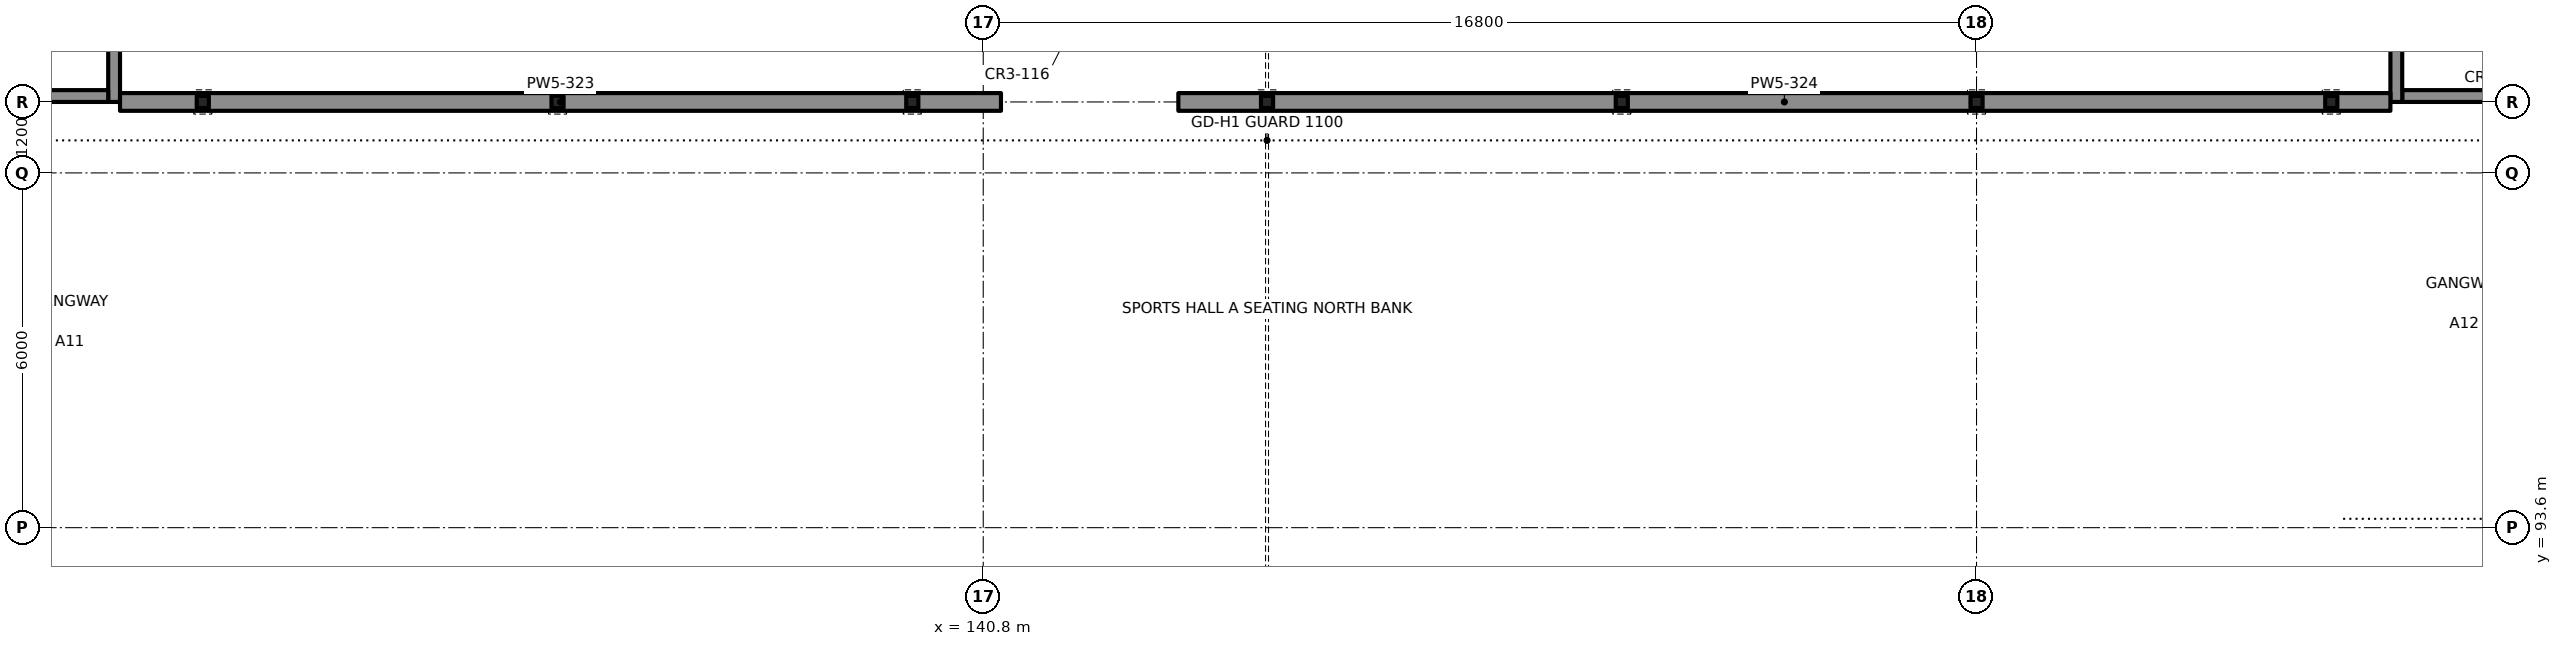
"""IFC4 building model, lengths in metres.
Left out: names, types, materials, properties, quantities, classifications, styles, units other than length and angle.
Written with IfcOpenShell. Run it as: python <this file> out.ifc"""

import sys

from ifc_helpers import new_model, si_unit, direction, frame, frame_2d, origin, origin_2d, place, context, subcontext, project, spatial, rectangle, i_section, extrude, element, save


model = new_model("IFC4")
c1 = context("Model", 3, precision=1e-05, world=origin(), true_north=direction((0.0, 1.0)))
c2 = subcontext(c1, "Body", "Model", "MODEL_VIEW")
j1 = project(units=[si_unit("LENGTHUNIT", "METRE"), si_unit("PLANEANGLEUNIT", "RADIAN")], contexts=[c1])
p1 = place(None, origin())
s1 = spatial("IfcSite", under=j1, at=p1, CompositionType="ELEMENT")
p2 = place(p1, origin())
s2 = spatial("IfcBuilding", under=s1, at=p2, CompositionType="ELEMENT")
p3 = place(p2, origin())
s3 = spatial("IfcBuildingStorey", under=s2, at=p3, CompositionType="ELEMENT", Elevation=0.0)
for number, where, z_axis, x_axis in (
    (1, (127.6, 100.8, -0.5), (0.0, 0.0, 1.0), (1.0, 0.0, 0.0)),
    (2, (133.6, 100.8, -0.5), (0.0, 0.0, 1.0), (1.0, 0.0, 0.0)),
    (3, (139.6, 100.8, -0.5), (0.0, 0.0, 1.0), (1.0, 0.0, 0.0)),
    (4, (145.6, 100.8, -0.5), (0.0, 0.0, 1.0), (1.0, 0.0, 0.0)),
    (5, (151.6, 100.8, -0.5), (0.0, 0.0, 1.0), (1.0, 0.0, 0.0)),
    (6, (157.6, 100.8, -0.5), (0.0, 0.0, 1.0), (1.0, 0.0, 0.0)),
    (7, (163.6, 100.8, -0.5), (0.0, 0.0, 1.0), (1.0, 0.0, 0.0)),
):
    element("IfcColumn", number, at=place(p3, frame(where, z_axis=z_axis, x_axis=x_axis)), inside=s3, PredefinedType="COLUMN", context=c2, shape_type="SweptSolid", body=[
        extrude(i_section(OverallWidth=0.205, OverallDepth=0.31, WebThickness=0.01, FlangeThickness=0.016, at=origin_2d()), origin(), (0.0, 0.0, 1.0), 4.9),
    ])
p4 = place(p3, frame((164.7, 100.8, 0.0), z_axis=(0.0, 0.0, 1.0), x_axis=(0.0, 1.0, 0.0)))
e8 = element("IfcWall", 8, at=p4, inside=s3, PredefinedType="SOLIDWALL", context=c2, shape_type="SweptSolid", body=[
    extrude(rectangle(XDim=6.783, YDim=0.2, at=frame_2d((3.392, 0.0))), origin(), (0.0, 0.0, 1.0), 4.4),
])
p5 = place(p4, frame((5.225, 0.0, 0.0)))
e9 = element("IfcOpeningElement", 9, at=p5, cuts=e8, PredefinedType="OPENING", context=c2, shape_type="SweptSolid", body=[
    extrude(rectangle(XDim=1.2, YDim=2.1, at=frame_2d((0.6, 1.05))), frame((0.0, 0.11, 0.0), z_axis=(0.0, -1.0, 0.0), x_axis=(1.0, 0.0, 0.0)), (0.0, 0.0, 1.0), 0.22),
])
p6 = place(p3, frame((164.8, 100.9, 0.0), z_axis=(0.0, 0.0, 1.0), x_axis=(1.0, 0.0, 0.0)))
e10 = element("IfcWall", 10, at=p6, inside=s3, PredefinedType="SOLIDWALL", context=c2, shape_type="SweptSolid", body=[
    extrude(rectangle(XDim=3.2, YDim=0.2, at=frame_2d((1.6, 0.0))), origin(), (0.0, 0.0, 1.0), 4.4),
])
p7 = place(p3, frame((126.1, 100.8, 0.0), z_axis=(0.0, 0.0, 1.0), x_axis=(0.0, 1.0, 0.0)))
e11 = element("IfcWall", 11, at=p7, inside=s3, PredefinedType="SOLIDWALL", context=c2, shape_type="SweptSolid", body=[
    extrude(rectangle(XDim=6.783, YDim=0.2, at=frame_2d((3.392, 0.0))), origin(), (0.0, 0.0, 1.0), 4.4),
])
p8 = place(p7, frame((5.225, 0.0, 0.0)))
e12 = element("IfcOpeningElement", 12, at=p8, cuts=e11, PredefinedType="OPENING", context=c2, shape_type="SweptSolid", body=[
    extrude(rectangle(XDim=1.2, YDim=2.1, at=frame_2d((0.6, 1.05))), frame((0.0, 0.11, 0.0), z_axis=(0.0, -1.0, 0.0), x_axis=(1.0, 0.0, 0.0)), (0.0, 0.0, 1.0), 0.22),
])
p9 = place(p3, frame((122.8, 100.9, 0.0), z_axis=(0.0, 0.0, 1.0), x_axis=(1.0, 0.0, 0.0)))
e13 = element("IfcWall", 13, at=p9, inside=s3, PredefinedType="SOLIDWALL", context=c2, shape_type="SweptSolid", body=[
    extrude(rectangle(XDim=3.2, YDim=0.2, at=frame_2d((1.6, 0.0))), origin(), (0.0, 0.0, 1.0), 4.4),
])
p10 = place(p3, frame((126.2, 100.8, 0.0), z_axis=(0.0, 0.0, 1.0), x_axis=(1.0, 0.0, 0.0)))
e14 = element("IfcWall", 14, at=p10, inside=s3, PredefinedType="PARTITIONING", context=c2, shape_type="SweptSolid", body=[
    extrude(rectangle(XDim=14.9, YDim=0.3, at=frame_2d((7.45, 0.0))), origin(), (0.0, 0.0, 1.0), 3.8),
])
p11 = place(p3, frame((144.1, 100.8, 0.0), z_axis=(0.0, 0.0, 1.0), x_axis=(1.0, 0.0, 0.0)))
e15 = element("IfcWall", 15, at=p11, inside=s3, PredefinedType="PARTITIONING", context=c2, shape_type="SweptSolid", body=[
    extrude(rectangle(XDim=20.5, YDim=0.3, at=frame_2d((10.25, 0.0))), origin(), (0.0, 0.0, 1.0), 3.8),
])
save(model, sys.argv[1])
